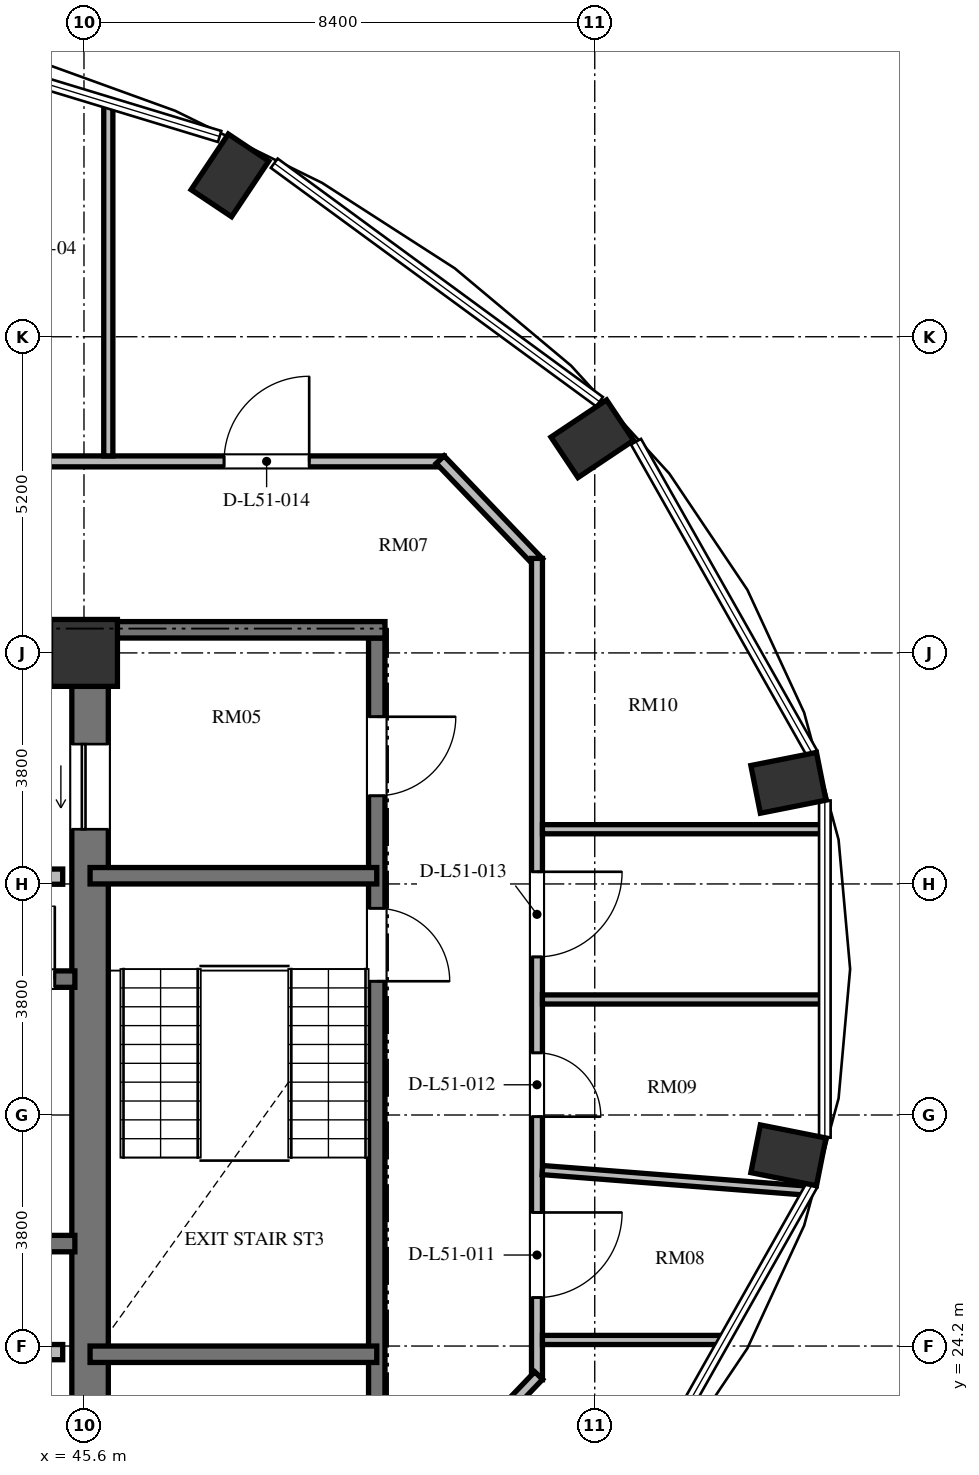
"""IFC4 building model, lengths in metres.
Left out: names, types, materials, properties, quantities, classifications, styles, units other than length and angle.
Written with IfcOpenShell. Run it as: python <this file> out.ifc"""

import sys

from ifc_helpers import new_model, si_unit, direction, frame, frame_2d, origin, origin_2d, place, context, subcontext, project, spatial, rectangle, extrude, element, fill, save


model = new_model("IFC4")
c1 = context("Model", 3, precision=1e-05, world=origin(), true_north=direction((0.0, 1.0)))
c2 = subcontext(c1, "Body", "Model", "MODEL_VIEW")
j1 = project(units=[si_unit("LENGTHUNIT", "METRE"), si_unit("PLANEANGLEUNIT", "RADIAN")], contexts=[c1])
p1 = place(None, origin())
s1 = spatial("IfcSite", under=j1, at=p1, CompositionType="ELEMENT")
p2 = place(p1, origin())
s2 = spatial("IfcBuilding", under=s1, at=p2, CompositionType="ELEMENT")
p3 = place(p2, frame((0.0, 0.0, 198.48)))
s3 = spatial("IfcBuildingStorey", under=s2, at=p3, CompositionType="ELEMENT", Elevation=198.48)
for number, where, z_axis, x_axis in (
    (1, (57.185, 27.337, 0.0), (0.0, 0.0, 1.0), (0.981, -0.195, 0.0)),
    (2, (57.185, 33.463, 0.0), (0.0, 0.0, 1.0), (0.981, 0.195, 0.0)),
    (3, (53.96, 39.123, 0.0), (0.0, 0.0, 1.0), (0.831, 0.556, 0.0)),
    (4, (48.0, 43.454, 0.0), (0.0, 0.0, 1.0), (0.556, 0.831, 0.0)),
):
    element("IfcColumn", number, at=place(p3, frame(where, z_axis=z_axis, x_axis=x_axis)), inside=s3, PredefinedType="COLUMN", context=c2, shape_type="SweptSolid", body=[
        extrude(rectangle(XDim=1.1, YDim=0.8, at=origin_2d()), origin(), (0.0, 0.0, 1.0), 3.648),
    ])
p4 = place(p3, frame((45.6, 35.6, 0.0), z_axis=(0.0, 0.0, 1.0), x_axis=(1.0, 0.0, 0.0)))
e5 = element("IfcColumn", 5, at=p4, inside=s3, PredefinedType="COLUMN", context=c2, shape_type="SweptSolid", body=[
    extrude(rectangle(XDim=1.1, YDim=1.1, at=origin_2d()), origin(), (0.0, 0.0, 1.0), 3.648),
])
p5 = place(p3, frame((45.7, 20.95, 0.0), z_axis=(0.0, 0.0, 1.0), x_axis=(0.0, 1.0, 0.0)))
e6 = element("IfcWall", 6, at=p5, inside=s3, PredefinedType="SHEAR", context=c2, shape_type="SweptSolid", body=[
    extrude(rectangle(XDim=14.1, YDim=0.6, at=frame_2d((7.05, 0.0))), origin(), (0.0, 0.0, 1.0), 3.648),
])
p6 = place(p5, frame((11.75, 0.0, 0.0)))
e7 = element("IfcOpeningElement", 7, at=p6, cuts=e6, PredefinedType="OPENING", context=c2, shape_type="SweptSolid", body=[
    extrude(rectangle(XDim=1.4, YDim=2.3, at=frame_2d((0.7, 1.15))), frame((0.0, 0.31, 0.0), z_axis=(0.0, -1.0, 0.0), x_axis=(1.0, 0.0, 0.0)), (0.0, 0.0, 1.0), 0.62),
])
p7 = place(p5, frame((0.95, 0.0, 0.0)))
e8 = element("IfcOpeningElement", 8, at=p7, cuts=e6, PredefinedType="OPENING", context=c2, shape_type="SweptSolid", body=[
    extrude(rectangle(XDim=1.4, YDim=2.3, at=frame_2d((0.7, 1.15))), frame((0.0, 0.31, 0.0), z_axis=(0.0, -1.0, 0.0), x_axis=(1.0, 0.0, 0.0)), (0.0, 0.0, 1.0), 0.62),
])
p8 = place(p3, frame((37.465, 30.235, 0.0), z_axis=(0.0, 0.0, 1.0), x_axis=(1.0, 0.0, 0.0)))
e9 = element("IfcWall", 9, at=p8, inside=s3, PredefinedType="SHEAR", context=c2, shape_type="SweptSolid", body=[
    extrude(rectangle(XDim=7.985, YDim=0.27, at=frame_2d((3.992, 0.0))), origin(), (0.0, 0.0, 1.0), 3.648),
])
p9 = place(p8, frame((6.455, 0.0, 0.0)))
e10 = element("IfcOpeningElement", 10, at=p9, cuts=e9, PredefinedType="OPENING", context=c2, shape_type="SweptSolid", body=[
    extrude(rectangle(XDim=1.2, YDim=2.15, at=frame_2d((0.6, 1.075))), frame((0.0, 0.145, 0.0), z_axis=(0.0, -1.0, 0.0), x_axis=(1.0, 0.0, 0.0)), (0.0, 0.0, 1.0), 0.29),
])
p10 = place(p3, frame((37.465, 25.885, 0.0), z_axis=(0.0, 0.0, 1.0), x_axis=(1.0, 0.0, 0.0)))
e11 = element("IfcWall", 11, at=p10, inside=s3, PredefinedType="SHEAR", context=c2, shape_type="SweptSolid", body=[
    extrude(rectangle(XDim=7.985, YDim=0.27, at=frame_2d((3.992, 0.0))), origin(), (0.0, 0.0, 1.0), 3.648),
])
for number, where, z_axis, x_axis in (
    (12, (42.95, 31.92, 0.0), (0.0, 0.0, 1.0), (1.0, 0.0, 0.0)),
    (13, (42.95, 24.1, 0.0), (0.0, 0.0, 1.0), (1.0, 0.0, 0.0)),
):
    element("IfcWall", number, at=place(p3, frame(where, z_axis=z_axis, x_axis=x_axis)), inside=s3, PredefinedType="SOLIDWALL", context=c2, shape_type="SweptSolid", body=[
        extrude(rectangle(XDim=2.3, YDim=0.25, at=frame_2d((1.15, 0.0))), origin(), (0.0, 0.0, 1.0), 3.448),
    ])
p11 = place(p3, frame((50.415, 35.845, 0.0), z_axis=(0.0, 0.0, 1.0), x_axis=(0.0, -1.0, 0.0)))
e14 = element("IfcWall", 14, at=p11, inside=s3, PredefinedType="SHEAR", context=c2, shape_type="SweptSolid", body=[
    extrude(rectangle(XDim=15.825, YDim=0.27, at=frame_2d((7.913, 0.0))), origin(), (0.0, 0.0, 1.0), 3.648),
])
p12 = place(p11, frame((4.445, 0.0, 0.0)))
e15 = element("IfcOpeningElement", 15, at=p12, cuts=e14, PredefinedType="OPENING", context=c2, shape_type="SweptSolid", body=[
    extrude(rectangle(XDim=1.2, YDim=2.15, at=frame_2d((0.6, 1.075))), frame((0.0, 0.145, 0.0), z_axis=(0.0, -1.0, 0.0), x_axis=(1.0, 0.0, 0.0)), (0.0, 0.0, 1.0), 0.29),
])
p13 = place(p11, frame((1.295, 0.0, 0.0)))
e16 = element("IfcOpeningElement", 16, at=p13, cuts=e14, PredefinedType="OPENING", context=c2, shape_type="SweptSolid", body=[
    extrude(rectangle(XDim=1.3, YDim=2.2, at=frame_2d((0.65, 1.1))), frame((0.0, 0.145, 0.0), z_axis=(0.0, -1.0, 0.0), x_axis=(1.0, 0.0, 0.0)), (0.0, 0.0, 1.0), 0.29),
])
p14 = place(p11, frame((13.095, 0.0, 0.0)))
e17 = element("IfcOpeningElement", 17, at=p14, cuts=e14, PredefinedType="OPENING", context=c2, shape_type="SweptSolid", body=[
    extrude(rectangle(XDim=1.3, YDim=2.2, at=frame_2d((0.65, 1.1))), frame((0.0, 0.145, 0.0), z_axis=(0.0, -1.0, 0.0), x_axis=(1.0, 0.0, 0.0)), (0.0, 0.0, 1.0), 0.29),
])
p15 = place(p3, frame((46.0, 35.98, 0.0), z_axis=(0.0, 0.0, 1.0), x_axis=(1.0, 0.0, 0.0)))
e18 = element("IfcWall", 18, at=p15, inside=s3, PredefinedType="SHEAR", context=c2, shape_type="SweptSolid", body=[
    extrude(rectangle(XDim=4.55, YDim=0.27, at=frame_2d((2.275, 0.0))), origin(), (0.0, 0.0, 1.0), 3.648),
])
for number, where, z_axis, x_axis in (
    (19, (45.7, 31.935, 0.0), (0.0, 0.0, 1.0), (1.0, 0.0, 0.0)),
    (20, (45.7, 24.065, 0.0), (0.0, 0.0, 1.0), (1.0, 0.0, 0.0)),
):
    element("IfcWall", number, at=place(p3, frame(where, z_axis=z_axis, x_axis=x_axis)), inside=s3, PredefinedType="SHEAR", context=c2, shape_type="SweptSolid", body=[
        extrude(rectangle(XDim=4.715, YDim=0.27, at=frame_2d((2.357, 0.0))), origin(), (0.0, 0.0, 1.0), 3.648),
    ])
p16 = place(p3, frame((30.71, 38.75, 0.0), z_axis=(0.0, 0.0, 1.0), x_axis=(1.0, 0.0, 0.0)))
e21 = element("IfcWall", 21, at=p16, inside=s3, PredefinedType="PARTITIONING", context=c2, shape_type="SweptSolid", body=[
    extrude(rectangle(XDim=20.815, YDim=0.18, at=frame_2d((10.408, 0.0))), origin(), (0.0, 0.0, 1.0), 3.073),
])
p17 = place(p16, frame((17.194, 0.0, 0.0)))
e22 = element("IfcOpeningElement", 22, at=p17, cuts=e21, PredefinedType="OPENING", context=c2, shape_type="SweptSolid", body=[
    extrude(rectangle(XDim=1.4, YDim=2.2, at=frame_2d((0.7, 1.1))), frame((0.0, 0.1, 0.0), z_axis=(0.0, -1.0, 0.0), x_axis=(1.0, 0.0, 0.0)), (0.0, 0.0, 1.0), 0.2),
])
p18 = place(p16, frame((12.59, 0.0, 0.0)))
e23 = element("IfcOpeningElement", 23, at=p18, cuts=e21, PredefinedType="OPENING", context=c2, shape_type="SweptSolid", body=[
    extrude(rectangle(XDim=1.4, YDim=2.2, at=frame_2d((0.7, 1.1))), frame((0.0, 0.1, 0.0), z_axis=(0.0, -1.0, 0.0), x_axis=(1.0, 0.0, 0.0)), (0.0, 0.0, 1.0), 0.2),
])
p19 = place(p16, frame((8.59, 0.0, 0.0)))
e24 = element("IfcOpeningElement", 24, at=p19, cuts=e21, PredefinedType="OPENING", context=c2, shape_type="SweptSolid", body=[
    extrude(rectangle(XDim=1.4, YDim=2.2, at=frame_2d((0.7, 1.1))), frame((0.0, 0.1, 0.0), z_axis=(0.0, -1.0, 0.0), x_axis=(1.0, 0.0, 0.0)), (0.0, 0.0, 1.0), 0.2),
])
p20 = place(p16, frame((4.59, 0.0, 0.0)))
e25 = element("IfcOpeningElement", 25, at=p20, cuts=e21, PredefinedType="OPENING", context=c2, shape_type="SweptSolid", body=[
    extrude(rectangle(XDim=1.4, YDim=2.2, at=frame_2d((0.7, 1.1))), frame((0.0, 0.1, 0.0), z_axis=(0.0, -1.0, 0.0), x_axis=(1.0, 0.0, 0.0)), (0.0, 0.0, 1.0), 0.2),
])
p21 = place(p16, frame((1.104, 0.0, 0.0)))
e26 = element("IfcOpeningElement", 26, at=p21, cuts=e21, PredefinedType="OPENING", context=c2, shape_type="SweptSolid", body=[
    extrude(rectangle(XDim=1.4, YDim=2.2, at=frame_2d((0.7, 1.1))), frame((0.0, 0.1, 0.0), z_axis=(0.0, -1.0, 0.0), x_axis=(1.0, 0.0, 0.0)), (0.0, 0.0, 1.0), 0.2),
])
p22 = place(p3, frame((51.458, 38.779, 0.0), z_axis=(0.0, 0.0, 1.0), x_axis=(0.691359830363, -0.722510612352, 0.0)))
e27 = element("IfcWall", 27, at=p22, inside=s3, PredefinedType="PARTITIONING", context=c2, shape_type="SweptSolid", body=[
    extrude(rectangle(XDim=2.343, YDim=0.18, at=frame_2d((1.172, 0.0))), origin(), (0.0, 0.0, 1.0), 3.033),
])
p23 = place(p3, frame((53.05, 37.155, 0.0), z_axis=(0.0, 0.0, 1.0), x_axis=(0.0, -1.0, 0.0)))
e28 = element("IfcWall", 28, at=p23, inside=s3, PredefinedType="PARTITIONING", context=c2, shape_type="SweptSolid", body=[
    extrude(rectangle(XDim=13.509, YDim=0.18, at=frame_2d((6.754, 0.0))), origin(), (0.0, 0.0, 1.0), 3.448),
])
p24 = place(p23, frame((10.758, 0.0, 0.0)))
e29 = element("IfcOpeningElement", 29, at=p24, cuts=e28, PredefinedType="OPENING", context=c2, shape_type="SweptSolid", body=[
    extrude(rectangle(XDim=1.4, YDim=2.2, at=frame_2d((0.7, 1.1))), frame((0.0, 0.1, 0.0), z_axis=(0.0, -1.0, 0.0), x_axis=(1.0, 0.0, 0.0)), (0.0, 0.0, 1.0), 0.2),
])
p25 = place(p23, frame((8.133, 0.0, 0.0)))
e30 = element("IfcOpeningElement", 30, at=p25, cuts=e28, PredefinedType="OPENING", context=c2, shape_type="SweptSolid", body=[
    extrude(rectangle(XDim=1.05, YDim=2.15, at=frame_2d((0.525, 1.075))), frame((0.0, 0.1, 0.0), z_axis=(0.0, -1.0, 0.0), x_axis=(1.0, 0.0, 0.0)), (0.0, 0.0, 1.0), 0.2),
])
p26 = place(p23, frame((5.155, 0.0, 0.0)))
e31 = element("IfcOpeningElement", 31, at=p26, cuts=e28, PredefinedType="OPENING", context=c2, shape_type="SweptSolid", body=[
    extrude(rectangle(XDim=1.4, YDim=2.2, at=frame_2d((0.7, 1.1))), frame((0.0, 0.1, 0.0), z_axis=(0.0, -1.0, 0.0), x_axis=(1.0, 0.0, 0.0)), (0.0, 0.0, 1.0), 0.2),
])
p27 = place(p3, frame((53.078, 23.714, 0.0), z_axis=(0.0, 0.0, 1.0), x_axis=(-0.691353379446, -0.722516785085, 0.0)))
e32 = element("IfcWall", 32, at=p27, inside=s3, PredefinedType="PARTITIONING", context=c2, shape_type="SweptSolid", body=[
    extrude(rectangle(XDim=3.604, YDim=0.18, at=frame_2d((1.802, 0.0))), origin(), (0.0, 0.0, 1.0), 3.448),
])
p28 = place(p3, frame((53.14, 24.3, 0.0), z_axis=(0.0, 0.0, 1.0), x_axis=(1.0, 0.0, 0.0)))
e33 = element("IfcWall", 33, at=p28, inside=s3, PredefinedType="PARTITIONING", context=c2, shape_type="SweptSolid", body=[
    extrude(rectangle(XDim=2.982, YDim=0.15, at=frame_2d((1.491, 0.0))), origin(), (0.0, 0.0, 1.0), 3.448),
])
p29 = place(p3, frame((53.14, 27.094, 0.0), z_axis=(0.0, 0.0, 1.0), x_axis=(0.996990775312, -0.077520280847, 0.0)))
e34 = element("IfcWall", 34, at=p29, inside=s3, PredefinedType="PARTITIONING", context=c2, shape_type="SweptSolid", body=[
    extrude(rectangle(XDim=4.396, YDim=0.15, at=frame_2d((2.198, 0.0))), origin(), (0.0, 0.0, 1.0), 3.448),
])
for number, where, z_axis, x_axis in (
    (35, (53.14, 29.9, 0.0), (0.0, 0.0, 1.0), (1.0, 0.0, 0.0)),
    (36, (53.14, 32.7, 0.0), (0.0, 0.0, 1.0), (1.0, 0.0, 0.0)),
):
    element("IfcWall", number, at=place(p3, frame(where, z_axis=z_axis, x_axis=x_axis)), inside=s3, PredefinedType="PARTITIONING", context=c2, shape_type="SweptSolid", body=[
        extrude(rectangle(XDim=4.632, YDim=0.15, at=frame_2d((2.316, 0.0))), origin(), (0.0, 0.0, 1.0), 3.448),
    ])
p30 = place(p3, frame((46.0, 38.84, 0.0), z_axis=(0.0, 0.0, 1.0), x_axis=(0.0, 1.0, 0.0)))
e37 = element("IfcWall", 37, at=p30, inside=s3, PredefinedType="PARTITIONING", context=c2, shape_type="SweptSolid", body=[
    extrude(rectangle(XDim=5.793, YDim=0.15, at=frame_2d((2.896, 0.0))), origin(), (0.0, 0.0, 1.0), 3.448),
])
p31 = place(p9, origin())
e38 = element("IfcDoor", 38, at=p31, inside=s3, OperationType="SINGLE_SWING_RIGHT", PredefinedType="DOOR", context=c2, shape_type="SweptSolid", body=[
    extrude(rectangle(XDim=1.2, YDim=2.15, at=frame_2d((0.6, 1.075))), frame((0.0, 0.025, 0.0), z_axis=(0.0, -1.0, 0.0), x_axis=(1.0, 0.0, 0.0)), (0.0, 0.0, 1.0), 0.05),
])
fill(e10, e38)
p32 = place(p6, origin())
e39 = element("IfcDoor", 39, at=p32, inside=s3, OperationType="SLIDING_TO_LEFT", PredefinedType="DOOR", context=c2, shape_type="SweptSolid", body=[
    extrude(rectangle(XDim=1.4, YDim=2.3, at=frame_2d((0.7, 1.15))), frame((0.0, 0.025, 0.0), z_axis=(0.0, -1.0, 0.0), x_axis=(1.0, 0.0, 0.0)), (0.0, 0.0, 1.0), 0.05),
])
fill(e7, e39)
p33 = place(p12, origin())
e40 = element("IfcDoor", 40, at=p33, inside=s3, OperationType="SINGLE_SWING_RIGHT", PredefinedType="DOOR", context=c2, shape_type="SweptSolid", body=[
    extrude(rectangle(XDim=1.2, YDim=2.15, at=frame_2d((0.6, 1.075))), frame((0.0, 0.025, 0.0), z_axis=(0.0, -1.0, 0.0), x_axis=(1.0, 0.0, 0.0)), (0.0, 0.0, 1.0), 0.05),
])
fill(e15, e40)
p34 = place(p13, origin())
e41 = element("IfcDoor", 41, at=p34, inside=s3, OperationType="SINGLE_SWING_LEFT", PredefinedType="DOOR", context=c2, shape_type="SweptSolid", body=[
    extrude(rectangle(XDim=1.3, YDim=2.2, at=frame_2d((0.65, 1.1))), frame((0.0, 0.025, 0.0), z_axis=(0.0, -1.0, 0.0), x_axis=(1.0, 0.0, 0.0)), (0.0, 0.0, 1.0), 0.05),
])
fill(e16, e41)
p35 = place(p24, origin())
e42 = element("IfcDoor", 42, at=p35, inside=s3, OperationType="SINGLE_SWING_LEFT", PredefinedType="DOOR", context=c2, shape_type="SweptSolid", body=[
    extrude(rectangle(XDim=1.4, YDim=2.2, at=frame_2d((0.7, 1.1))), frame((0.0, 0.025, 0.0), z_axis=(0.0, -1.0, 0.0), x_axis=(1.0, 0.0, 0.0)), (0.0, 0.0, 1.0), 0.05),
])
fill(e29, e42)
p36 = place(p25, origin())
e43 = element("IfcDoor", 43, at=p36, inside=s3, OperationType="SINGLE_SWING_RIGHT", PredefinedType="DOOR", context=c2, shape_type="SweptSolid", body=[
    extrude(rectangle(XDim=1.05, YDim=2.15, at=frame_2d((0.525, 1.075))), frame((0.0, 0.025, 0.0), z_axis=(0.0, -1.0, 0.0), x_axis=(1.0, 0.0, 0.0)), (0.0, 0.0, 1.0), 0.05),
])
fill(e30, e43)
p37 = place(p26, origin())
e44 = element("IfcDoor", 44, at=p37, inside=s3, OperationType="SINGLE_SWING_LEFT", PredefinedType="DOOR", context=c2, shape_type="SweptSolid", body=[
    extrude(rectangle(XDim=1.4, YDim=2.2, at=frame_2d((0.7, 1.1))), frame((0.0, 0.025, 0.0), z_axis=(0.0, -1.0, 0.0), x_axis=(1.0, 0.0, 0.0)), (0.0, 0.0, 1.0), 0.05),
])
fill(e31, e44)
p38 = place(p17, origin())
e45 = element("IfcDoor", 45, at=p38, inside=s3, OperationType="SINGLE_SWING_RIGHT", PredefinedType="DOOR", context=c2, shape_type="SweptSolid", body=[
    extrude(rectangle(XDim=1.4, YDim=2.2, at=frame_2d((0.7, 1.1))), frame((0.0, 0.025, 0.0), z_axis=(0.0, -1.0, 0.0), x_axis=(1.0, 0.0, 0.0)), (0.0, 0.0, 1.0), 0.05),
])
fill(e22, e45)
save(model, sys.argv[1])
